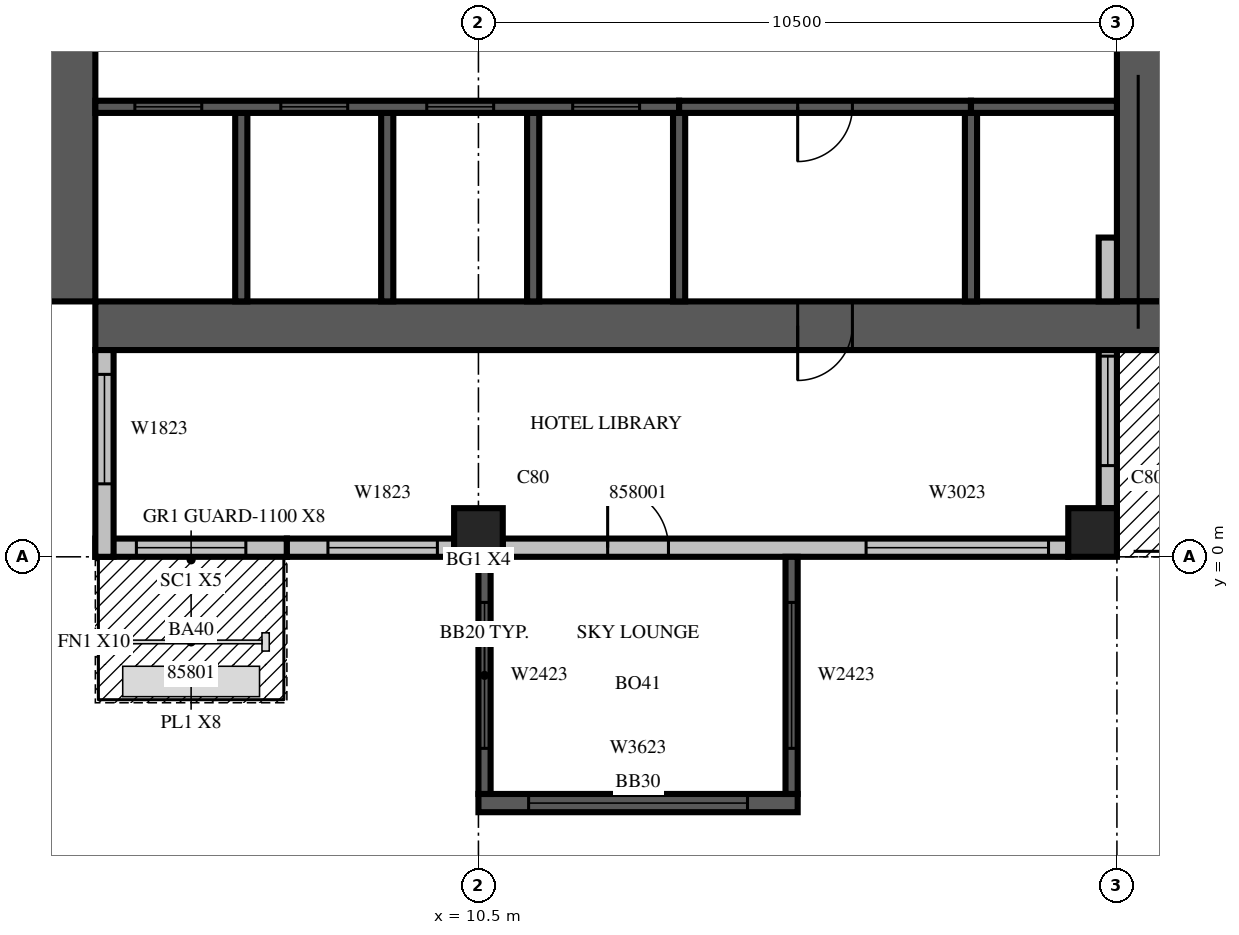
"""IFC4 building model, lengths in metres.
Left out: names, types, materials, properties, quantities, classifications, styles, units other than length and angle.
Written with IfcOpenShell. Run it as: python <this file> out.ifc"""

import sys

from ifc_helpers import new_model, si_unit, direction, frame, frame_2d, origin, origin_2d, place, context, subcontext, project, spatial, rectangle, extrude, source, transform, mapped, element, fill, save


model = new_model("IFC4")
c1 = context("Model", 3, precision=1e-05, world=origin(), true_north=direction((0.0, 1.0)))
c2 = subcontext(c1, "Body", "Model", "MODEL_VIEW")
j1 = project(units=[si_unit("LENGTHUNIT", "METRE"), si_unit("PLANEANGLEUNIT", "RADIAN")], contexts=[c1])
p1 = place(None, origin())
s1 = spatial("IfcSite", under=j1, at=p1, CompositionType="ELEMENT")
p2 = place(p1, origin())
s2 = spatial("IfcBuilding", under=s1, at=p2, CompositionType="ELEMENT")
p3 = place(p2, frame((0.0, 0.0, 253.8)))
s3 = spatial("IfcBuildingStorey", under=s2, at=p3, CompositionType="ELEMENT", Elevation=253.8)
m1 = source(origin(), c2, "Body", "SweptSolid", [
    extrude(rectangle(XDim=0.8, YDim=0.8, at=origin_2d()), origin(), (0.0, 0.0, 1.0), 3.8),
])
for number, where, z_axis, x_axis in (
    (1, (10.5, 0.4, 0.0), (0.0, 0.0, 1.0), (1.0, 0.0, 0.0)),
    (2, (20.6, 0.4, 0.0), (0.0, 0.0, 1.0), (1.0, 0.0, 0.0)),
):
    element("IfcColumn", number, at=place(p3, frame(where, z_axis=z_axis, x_axis=x_axis)), inside=s3, PredefinedType="COLUMN", context=c2, shape_type="MappedRepresentation", body=[
        mapped(m1, transform((0.0, 0.0, 0.0), scale=1.0)),
    ])
m2 = source(origin(), c2, "Body", "SweptSolid", [
    extrude(rectangle(XDim=17.6, YDim=0.8, at=frame_2d((8.8, 0.0))), origin(), (0.0, 0.0, 1.0), 3.8),
])
p4 = place(p3, frame((3.8, 4.2, 0.0), z_axis=(0.0, 0.0, 1.0), x_axis=(0.0, 1.0, 0.0)))
e3 = element("IfcWall", 3, at=p4, inside=s3, PredefinedType="SHEAR", context=c2, shape_type="MappedRepresentation", body=[
    mapped(m2, transform((0.0, 0.0, 0.0), scale=1.0)),
])
m3 = source(origin(), c2, "Body", "SweptSolid", [
    extrude(rectangle(XDim=2.2, YDim=2.1, at=frame_2d((1.1, 1.05))), frame((0.0, 0.41, 0.0), z_axis=(0.0, -1.0, 0.0), x_axis=(1.0, 0.0, 0.0)), (0.0, 0.0, 1.0), 0.82),
])
p5 = place(p4, frame((4.2, 0.0, 0.0)))
e4 = element("IfcOpeningElement", 4, at=p5, cuts=e3, PredefinedType="OPENING", context=c2, shape_type="MappedRepresentation", body=[
    mapped(m3, transform((0.0, 0.0, 0.0), scale=1.0)),
])
m4 = source(origin(), c2, "Body", "SweptSolid", [
    extrude(rectangle(XDim=0.9, YDim=2.1, at=frame_2d((0.45, 1.05))), frame((0.0, 0.41, 0.0), z_axis=(0.0, -1.0, 0.0), x_axis=(1.0, 0.0, 0.0)), (0.0, 0.0, 1.0), 0.82),
])
p6 = place(p4, frame((10.95, 0.0, 0.0)))
e5 = element("IfcOpeningElement", 5, at=p6, cuts=e3, PredefinedType="OPENING", context=c2, shape_type="MappedRepresentation", body=[
    mapped(m4, transform((0.0, 0.0, 0.0), scale=1.0)),
])
m5 = source(origin(), c2, "Body", "SweptSolid", [
    extrude(rectangle(XDim=16.8, YDim=0.8, at=frame_2d((8.4, 0.0))), origin(), (0.0, 0.0, 1.0), 3.8),
])
p7 = place(p3, frame((21.4, 4.2, 0.0), z_axis=(0.0, 0.0, 1.0), x_axis=(0.0, 1.0, 0.0)))
e6 = element("IfcWall", 6, at=p7, inside=s3, PredefinedType="SHEAR", context=c2, shape_type="MappedRepresentation", body=[
    mapped(m5, transform((0.0, 0.0, 0.0), scale=1.0)),
])
p8 = place(p7, frame((4.2, 0.0, 0.0)))
e7 = element("IfcOpeningElement", 7, at=p8, cuts=e6, PredefinedType="OPENING", context=c2, shape_type="MappedRepresentation", body=[
    mapped(m3, transform((0.0, 0.0, 0.0), scale=1.0)),
])
m6 = source(origin(), c2, "Body", "SweptSolid", [
    extrude(rectangle(XDim=1.2, YDim=2.1, at=frame_2d((0.6, 1.05))), frame((0.0, 0.41, 0.0), z_axis=(0.0, -1.0, 0.0), x_axis=(1.0, 0.0, 0.0)), (0.0, 0.0, 1.0), 0.82),
])
p9 = place(p7, frame((14.7, 0.0, 0.0)))
e8 = element("IfcOpeningElement", 8, at=p9, cuts=e6, PredefinedType="OPENING", context=c2, shape_type="MappedRepresentation", body=[
    mapped(m6, transform((0.0, 0.0, 0.0), scale=1.0)),
])
p10 = place(p3, frame((4.2, 3.8, 0.0), z_axis=(0.0, 0.0, 1.0), x_axis=(1.0, 0.0, 0.0)))
e9 = element("IfcWall", 9, at=p10, inside=s3, PredefinedType="SHEAR", context=c2, shape_type="MappedRepresentation", body=[
    mapped(m2, transform((0.0, 0.0, 0.0), scale=1.0)),
])
p11 = place(p10, frame((11.55, 0.0, 0.0)))
e10 = element("IfcOpeningElement", 10, at=p11, cuts=e9, PredefinedType="OPENING", context=c2, shape_type="MappedRepresentation", body=[
    mapped(m4, transform((0.0, 0.0, 0.0), scale=1.0)),
])
m7 = source(origin(), c2, "Body", "SweptSolid", [
    extrude(rectangle(XDim=3.15, YDim=0.3, at=frame_2d((1.575, 0.0))), origin(), (0.0, 0.0, 1.0), 3.4),
])
p12 = place(p3, frame((4.2, 0.15, 0.0), z_axis=(0.0, 0.0, 1.0), x_axis=(1.0, 0.0, 0.0)))
e11 = element("IfcWall", 11, at=p12, inside=s3, PredefinedType="STANDARD", context=c2, shape_type="MappedRepresentation", body=[
    mapped(m7, transform((0.0, 0.0, 0.0), scale=1.0)),
])
m8 = source(origin(), c2, "Body", "SweptSolid", [
    extrude(rectangle(XDim=1.8, YDim=2.4, at=frame_2d((0.9, 1.2))), frame((0.0, 0.16, 0.0), z_axis=(0.0, -1.0, 0.0), x_axis=(1.0, 0.0, 0.0)), (0.0, 0.0, 1.0), 0.32),
])
p13 = place(p12, frame((0.675, 0.0, 0.0)))
e12 = element("IfcOpeningElement", 12, at=p13, cuts=e11, PredefinedType="OPENING", context=c2, shape_type="MappedRepresentation", body=[
    mapped(m8, transform((0.0, 0.0, 0.0), scale=1.0)),
])
m9 = source(origin(), c2, "Body", "SweptSolid", [
    extrude(rectangle(XDim=2.75, YDim=0.3, at=frame_2d((1.375, 0.0))), origin(), (0.0, 0.0, 1.0), 3.4),
])
p14 = place(p3, frame((7.35, 0.15, 0.0), z_axis=(0.0, 0.0, 1.0), x_axis=(1.0, 0.0, 0.0)))
e13 = element("IfcWall", 13, at=p14, inside=s3, PredefinedType="STANDARD", context=c2, shape_type="MappedRepresentation", body=[
    mapped(m9, transform((0.0, 0.0, 0.0), scale=1.0)),
])
m10 = source(origin(), c2, "Body", "SweptSolid", [
    extrude(rectangle(XDim=1.8, YDim=2.3, at=frame_2d((0.9, 1.15))), frame((0.0, 0.16, 0.0), z_axis=(0.0, -1.0, 0.0), x_axis=(1.0, 0.0, 0.0)), (0.0, 0.0, 1.0), 0.32),
])
p15 = place(p14, frame((0.675, 0.0, 0.6)))
e14 = element("IfcOpeningElement", 14, at=p15, cuts=e13, PredefinedType="OPENING", context=c2, shape_type="MappedRepresentation", body=[
    mapped(m10, transform((0.0, 0.0, 0.0), scale=1.0)),
])
m11 = source(origin(), c2, "Body", "SweptSolid", [
    extrude(rectangle(XDim=9.3, YDim=0.3, at=frame_2d((4.65, 0.0))), origin(), (0.0, 0.0, 1.0), 3.4),
])
p16 = place(p3, frame((10.9, 0.15, 0.0), z_axis=(0.0, 0.0, 1.0), x_axis=(1.0, 0.0, 0.0)))
e15 = element("IfcWall", 15, at=p16, inside=s3, PredefinedType="STANDARD", context=c2, shape_type="MappedRepresentation", body=[
    mapped(m11, transform((0.0, 0.0, 0.0), scale=1.0)),
])
m12 = source(origin(), c2, "Body", "SweptSolid", [
    extrude(rectangle(XDim=3.0, YDim=2.3, at=frame_2d((1.5, 1.15))), frame((0.0, 0.16, 0.0), z_axis=(0.0, -1.0, 0.0), x_axis=(1.0, 0.0, 0.0)), (0.0, 0.0, 1.0), 0.32),
])
p17 = place(p16, frame((5.975, 0.0, 0.6)))
e16 = element("IfcOpeningElement", 16, at=p17, cuts=e15, PredefinedType="OPENING", context=c2, shape_type="MappedRepresentation", body=[
    mapped(m12, transform((0.0, 0.0, 0.0), scale=1.0)),
])
m13 = source(origin(), c2, "Body", "SweptSolid", [
    extrude(rectangle(XDim=1.0, YDim=2.1, at=frame_2d((0.5, 1.05))), frame((0.0, 0.16, 0.0), z_axis=(0.0, -1.0, 0.0), x_axis=(1.0, 0.0, 0.0)), (0.0, 0.0, 1.0), 0.32),
])
p18 = place(p16, frame((1.725, 0.0, 0.0)))
e17 = element("IfcOpeningElement", 17, at=p18, cuts=e15, PredefinedType="OPENING", context=c2, shape_type="MappedRepresentation", body=[
    mapped(m13, transform((0.0, 0.0, 0.0), scale=1.0)),
])
m14 = source(origin(), c2, "Body", "SweptSolid", [
    extrude(rectangle(XDim=2.6, YDim=0.3, at=frame_2d((1.3, 0.0))), origin(), (0.0, 0.0, 1.0), 3.4),
])
p19 = place(p3, frame((20.85, 0.8, 0.0), z_axis=(0.0, 0.0, 1.0), x_axis=(0.0, 1.0, 0.0)))
e18 = element("IfcWall", 18, at=p19, inside=s3, PredefinedType="STANDARD", context=c2, shape_type="MappedRepresentation", body=[
    mapped(m14, transform((0.0, 0.0, 0.0), scale=1.0)),
])
p20 = place(p19, frame((0.7, 0.0, 0.0)))
e19 = element("IfcOpeningElement", 19, at=p20, cuts=e18, PredefinedType="OPENING", context=c2, shape_type="MappedRepresentation", body=[
    mapped(m8, transform((0.0, 0.0, 0.0), scale=1.0)),
])
m15 = source(origin(), c2, "Body", "SweptSolid", [
    extrude(rectangle(XDim=1.05, YDim=0.3, at=frame_2d((0.525, 0.0))), origin(), (0.0, 0.0, 1.0), 3.4),
])
p21 = place(p3, frame((20.85, 4.2, 0.0), z_axis=(0.0, 0.0, 1.0), x_axis=(0.0, 1.0, 0.0)))
e20 = element("IfcWall", 20, at=p21, inside=s3, PredefinedType="STANDARD", context=c2, shape_type="MappedRepresentation", body=[
    mapped(m15, transform((0.0, 0.0, 0.0), scale=1.0)),
])
m16 = source(origin(), c2, "Body", "SweptSolid", [
    extrude(rectangle(XDim=3.4, YDim=0.3, at=frame_2d((1.7, 0.0))), origin(), (0.0, 0.0, 1.0), 3.4),
])
p22 = place(p3, frame((4.35, 3.4, 0.0), z_axis=(0.0, 0.0, 1.0), x_axis=(0.0, -1.0, 0.0)))
e21 = element("IfcWall", 21, at=p22, inside=s3, PredefinedType="STANDARD", context=c2, shape_type="MappedRepresentation", body=[
    mapped(m16, transform((0.0, 0.0, 0.0), scale=1.0)),
])
p23 = place(p22, frame((0.4, 0.0, 0.6)))
e22 = element("IfcOpeningElement", 22, at=p23, cuts=e21, PredefinedType="OPENING", context=c2, shape_type="MappedRepresentation", body=[
    mapped(m10, transform((0.0, 0.0, 0.0), scale=1.0)),
])
m17 = source(origin(), c2, "Body", "SweptSolid", [
    extrude(rectangle(XDim=5.25, YDim=0.3, at=frame_2d((2.625, 0.0))), origin(), (0.0, 0.0, 1.0), 3.39),
])
p24 = place(p3, frame((10.5, -4.05, 0.0), z_axis=(0.0, 0.0, 1.0), x_axis=(1.0, 0.0, 0.0)))
e23 = element("IfcWall", 23, at=p24, inside=s3, PredefinedType="SOLIDWALL", context=c2, shape_type="MappedRepresentation", body=[
    mapped(m17, transform((0.0, 0.0, 0.0), scale=1.0)),
])
m18 = source(origin(), c2, "Body", "SweptSolid", [
    extrude(rectangle(XDim=3.6, YDim=2.3, at=frame_2d((1.8, 1.15))), frame((0.0, 0.16, 0.0), z_axis=(0.0, -1.0, 0.0), x_axis=(1.0, 0.0, 0.0)), (0.0, 0.0, 1.0), 0.32),
])
p25 = place(p24, frame((0.825, 0.0, 0.6)))
e24 = element("IfcOpeningElement", 24, at=p25, cuts=e23, PredefinedType="OPENING", context=c2, shape_type="MappedRepresentation", body=[
    mapped(m18, transform((0.0, 0.0, 0.0), scale=1.0)),
])
m19 = source(origin(), c2, "Body", "SweptSolid", [
    extrude(rectangle(XDim=3.9, YDim=0.2, at=frame_2d((1.95, 0.0))), origin(), (0.0, 0.0, 1.0), 3.39),
])
p26 = place(p3, frame((10.6, 0.0, 0.0), z_axis=(0.0, 0.0, 1.0), x_axis=(0.0, -1.0, 0.0)))
e25 = element("IfcWall", 25, at=p26, inside=s3, PredefinedType="SOLIDWALL", context=c2, shape_type="MappedRepresentation", body=[
    mapped(m19, transform((0.0, 0.0, 0.0), scale=1.0)),
])
m20 = source(origin(), c2, "Body", "SweptSolid", [
    extrude(rectangle(XDim=2.4, YDim=2.3, at=frame_2d((1.2, 1.15))), frame((0.0, 0.11, 0.0), z_axis=(0.0, -1.0, 0.0), x_axis=(1.0, 0.0, 0.0)), (0.0, 0.0, 1.0), 0.22),
])
p27 = place(p26, frame((0.75, 0.0, 0.6)))
e26 = element("IfcOpeningElement", 26, at=p27, cuts=e25, PredefinedType="OPENING", context=c2, shape_type="MappedRepresentation", body=[
    mapped(m20, transform((0.0, 0.0, 0.0), scale=1.0)),
])
p28 = place(p3, frame((15.65, 0.0, 0.0), z_axis=(0.0, 0.0, 1.0), x_axis=(0.0, -1.0, 0.0)))
e27 = element("IfcWall", 27, at=p28, inside=s3, PredefinedType="SOLIDWALL", context=c2, shape_type="MappedRepresentation", body=[
    mapped(m19, transform((0.0, 0.0, 0.0), scale=1.0)),
])
p29 = place(p28, frame((0.75, 0.0, 0.6)))
e28 = element("IfcOpeningElement", 28, at=p29, cuts=e27, PredefinedType="OPENING", context=c2, shape_type="MappedRepresentation", body=[
    mapped(m20, transform((0.0, 0.0, 0.0), scale=1.0)),
])
m21 = source(origin(), c2, "Body", "SweptSolid", [
    extrude(rectangle(XDim=3.1, YDim=0.2, at=frame_2d((1.55, 0.0))), origin(), (0.0, 0.0, 1.0), 3.8),
])
for number, where, z_axis, x_axis in (
    (29, (6.6, 4.2, 0.0), (0.0, 0.0, 1.0), (0.0, 1.0, 0.0)),
    (30, (9.0, 4.2, 0.0), (0.0, 0.0, 1.0), (0.0, 1.0, 0.0)),
    (31, (11.4, 4.2, 0.0), (0.0, 0.0, 1.0), (0.0, 1.0, 0.0)),
):
    element("IfcWall", number, at=place(p3, frame(where, z_axis=z_axis, x_axis=x_axis)), inside=s3, PredefinedType="SOLIDWALL", context=c2, shape_type="MappedRepresentation", body=[
        mapped(m21, transform((0.0, 0.0, 0.0), scale=1.0)),
    ])
m22 = source(origin(), c2, "Body", "SweptSolid", [
    extrude(rectangle(XDim=3.1, YDim=0.2, at=frame_2d((1.55, 0.0))), origin(), (0.0, 0.0, 1.0), 3.4),
])
for number, where, z_axis, x_axis in (
    (32, (13.8, 4.2, 0.0), (0.0, 0.0, 1.0), (0.0, 1.0, 0.0)),
    (33, (18.6, 4.2, 0.0), (0.0, 0.0, 1.0), (0.0, 1.0, 0.0)),
):
    element("IfcWall", number, at=place(p3, frame(where, z_axis=z_axis, x_axis=x_axis)), inside=s3, PredefinedType="SOLIDWALL", context=c2, shape_type="MappedRepresentation", body=[
        mapped(m22, transform((0.0, 0.0, 0.0), scale=1.0)),
    ])
m23 = source(origin(), c2, "Body", "SweptSolid", [
    extrude(rectangle(XDim=9.6, YDim=0.2, at=frame_2d((4.8, 0.0))), origin(), (0.0, 0.0, 1.0), 3.8),
])
p30 = place(p3, frame((4.2, 7.4, 0.0), z_axis=(0.0, 0.0, 1.0), x_axis=(1.0, 0.0, 0.0)))
e34 = element("IfcWall", 34, at=p30, inside=s3, PredefinedType="SOLIDWALL", context=c2, shape_type="MappedRepresentation", body=[
    mapped(m23, transform((0.0, 0.0, 0.0), scale=1.0)),
])
m24 = source(origin(), c2, "Body", "SweptSolid", [
    extrude(rectangle(XDim=1.1, YDim=2.1, at=frame_2d((0.55, 1.05))), frame((0.0, 0.11, 0.0), z_axis=(0.0, -1.0, 0.0), x_axis=(1.0, 0.0, 0.0)), (0.0, 0.0, 1.0), 0.22),
])
p31 = place(p30, frame((0.65, 0.0, 0.0)))
e35 = element("IfcOpeningElement", 35, at=p31, cuts=e34, PredefinedType="OPENING", context=c2, shape_type="MappedRepresentation", body=[
    mapped(m24, transform((0.0, 0.0, 0.0), scale=1.0)),
])
p32 = place(p30, frame((3.05, 0.0, 0.0)))
e36 = element("IfcOpeningElement", 36, at=p32, cuts=e34, PredefinedType="OPENING", context=c2, shape_type="MappedRepresentation", body=[
    mapped(m24, transform((0.0, 0.0, 0.0), scale=1.0)),
])
p33 = place(p30, frame((5.45, 0.0, 0.0)))
e37 = element("IfcOpeningElement", 37, at=p33, cuts=e34, PredefinedType="OPENING", context=c2, shape_type="MappedRepresentation", body=[
    mapped(m24, transform((0.0, 0.0, 0.0), scale=1.0)),
])
p34 = place(p30, frame((7.85, 0.0, 0.0)))
e38 = element("IfcOpeningElement", 38, at=p34, cuts=e34, PredefinedType="OPENING", context=c2, shape_type="MappedRepresentation", body=[
    mapped(m24, transform((0.0, 0.0, 0.0), scale=1.0)),
])
m25 = source(origin(), c2, "Body", "SweptSolid", [
    extrude(rectangle(XDim=4.8, YDim=0.2, at=frame_2d((2.4, 0.0))), origin(), (0.0, 0.0, 1.0), 3.4),
])
p35 = place(p3, frame((13.8, 7.4, 0.0), z_axis=(0.0, 0.0, 1.0), x_axis=(1.0, 0.0, 0.0)))
e39 = element("IfcWall", 39, at=p35, inside=s3, PredefinedType="SOLIDWALL", context=c2, shape_type="MappedRepresentation", body=[
    mapped(m25, transform((0.0, 0.0, 0.0), scale=1.0)),
])
m26 = source(origin(), c2, "Body", "SweptSolid", [
    extrude(rectangle(XDim=0.9, YDim=2.1, at=frame_2d((0.45, 1.05))), frame((0.0, 0.11, 0.0), z_axis=(0.0, -1.0, 0.0), x_axis=(1.0, 0.0, 0.0)), (0.0, 0.0, 1.0), 0.22),
])
p36 = place(p35, frame((1.95, 0.0, 0.0)))
e40 = element("IfcOpeningElement", 40, at=p36, cuts=e39, PredefinedType="OPENING", context=c2, shape_type="MappedRepresentation", body=[
    mapped(m26, transform((0.0, 0.0, 0.0), scale=1.0)),
])
m27 = source(origin(), c2, "Body", "SweptSolid", [
    extrude(rectangle(XDim=2.4, YDim=0.2, at=frame_2d((1.2, 0.0))), origin(), (0.0, 0.0, 1.0), 3.8),
])
p37 = place(p3, frame((18.6, 7.4, 0.0), z_axis=(0.0, 0.0, 1.0), x_axis=(1.0, 0.0, 0.0)))
e41 = element("IfcWall", 41, at=p37, inside=s3, PredefinedType="SOLIDWALL", context=c2, shape_type="MappedRepresentation", body=[
    mapped(m27, transform((0.0, 0.0, 0.0), scale=1.0)),
])
m28 = source(origin(), c2, "Body", "SweptSolid", [
    extrude(rectangle(XDim=1.8, YDim=2.4, at=frame_2d((0.9, 1.2))), frame((0.0, 0.025, 0.0), z_axis=(0.0, -1.0, 0.0), x_axis=(1.0, 0.0, 0.0)), (0.0, 0.0, 1.0), 0.05),
])
p38 = place(p13, origin())
e42 = element("IfcDoor", 42, at=p38, inside=s3, OperationType="SLIDING_TO_LEFT", PredefinedType="DOOR", context=c2, shape_type="MappedRepresentation", body=[
    mapped(m28, transform((0.0, 0.0, 0.0), scale=1.0)),
])
fill(e12, e42)
m29 = source(origin(), c2, "Body", "SweptSolid", [
    extrude(rectangle(XDim=1.8, YDim=2.3, at=frame_2d((0.9, 1.15))), frame((0.0, 0.03, 0.0), z_axis=(0.0, -1.0, 0.0), x_axis=(1.0, 0.0, 0.0)), (0.0, 0.0, 1.0), 0.06),
])
p39 = place(p15, origin())
e43 = element("IfcWindow", 43, at=p39, inside=s3, PartitioningType="SINGLE_PANEL", PredefinedType="WINDOW", context=c2, shape_type="MappedRepresentation", body=[
    mapped(m29, transform((0.0, 0.0, 0.0), scale=1.0)),
])
fill(e14, e43)
m30 = source(origin(), c2, "Body", "SweptSolid", [
    extrude(rectangle(XDim=3.0, YDim=2.3, at=frame_2d((1.5, 1.15))), frame((0.0, 0.03, 0.0), z_axis=(0.0, -1.0, 0.0), x_axis=(1.0, 0.0, 0.0)), (0.0, 0.0, 1.0), 0.06),
])
p40 = place(p17, origin())
e44 = element("IfcWindow", 44, at=p40, inside=s3, PartitioningType="SINGLE_PANEL", PredefinedType="WINDOW", context=c2, shape_type="MappedRepresentation", body=[
    mapped(m30, transform((0.0, 0.0, 0.0), scale=1.0)),
])
fill(e16, e44)
p41 = place(p20, origin())
e45 = element("IfcDoor", 45, at=p41, inside=s3, OperationType="SLIDING_TO_LEFT", PredefinedType="DOOR", context=c2, shape_type="MappedRepresentation", body=[
    mapped(m28, transform((0.0, 0.0, 0.0), scale=1.0)),
])
fill(e19, e45)
p42 = place(p23, origin())
e46 = element("IfcWindow", 46, at=p42, inside=s3, PartitioningType="SINGLE_PANEL", PredefinedType="WINDOW", context=c2, shape_type="MappedRepresentation", body=[
    mapped(m29, transform((0.0, 0.0, 0.0), scale=1.0)),
])
fill(e22, e46)
m31 = source(origin(), c2, "Body", "SweptSolid", [
    extrude(rectangle(XDim=3.6, YDim=2.3, at=frame_2d((1.8, 1.15))), frame((0.0, 0.03, 0.0), z_axis=(0.0, -1.0, 0.0), x_axis=(1.0, 0.0, 0.0)), (0.0, 0.0, 1.0), 0.06),
])
p43 = place(p25, origin())
e47 = element("IfcWindow", 47, at=p43, inside=s3, PartitioningType="SINGLE_PANEL", PredefinedType="WINDOW", context=c2, shape_type="MappedRepresentation", body=[
    mapped(m31, transform((0.0, 0.0, 0.0), scale=1.0)),
])
fill(e24, e47)
m32 = source(origin(), c2, "Body", "SweptSolid", [
    extrude(rectangle(XDim=2.4, YDim=2.3, at=frame_2d((1.2, 1.15))), frame((0.0, 0.03, 0.0), z_axis=(0.0, -1.0, 0.0), x_axis=(1.0, 0.0, 0.0)), (0.0, 0.0, 1.0), 0.06),
])
p44 = place(p27, origin())
e48 = element("IfcWindow", 48, at=p44, inside=s3, PartitioningType="SINGLE_PANEL", PredefinedType="WINDOW", context=c2, shape_type="MappedRepresentation", body=[
    mapped(m32, transform((0.0, 0.0, 0.0), scale=1.0)),
])
fill(e26, e48)
p45 = place(p29, origin())
e49 = element("IfcWindow", 49, at=p45, inside=s3, PartitioningType="SINGLE_PANEL", PredefinedType="WINDOW", context=c2, shape_type="MappedRepresentation", body=[
    mapped(m32, transform((0.0, 0.0, 0.0), scale=1.0)),
])
fill(e28, e49)
m33 = source(origin(), c2, "Body", "SweptSolid", [
    extrude(rectangle(XDim=1.1, YDim=2.1, at=frame_2d((0.55, 1.05))), frame((0.0, 0.025, 0.0), z_axis=(0.0, -1.0, 0.0), x_axis=(1.0, 0.0, 0.0)), (0.0, 0.0, 1.0), 0.05),
])
p46 = place(p31, origin())
e50 = element("IfcDoor", 50, at=p46, inside=s3, OperationType="SLIDING_TO_LEFT", PredefinedType="DOOR", context=c2, shape_type="MappedRepresentation", body=[
    mapped(m33, transform((0.0, 0.0, 0.0), scale=1.0)),
])
fill(e35, e50)
p47 = place(p32, origin())
e51 = element("IfcDoor", 51, at=p47, inside=s3, OperationType="SLIDING_TO_LEFT", PredefinedType="DOOR", context=c2, shape_type="MappedRepresentation", body=[
    mapped(m33, transform((0.0, 0.0, 0.0), scale=1.0)),
])
fill(e36, e51)
p48 = place(p33, origin())
e52 = element("IfcDoor", 52, at=p48, inside=s3, OperationType="SLIDING_TO_LEFT", PredefinedType="DOOR", context=c2, shape_type="MappedRepresentation", body=[
    mapped(m33, transform((0.0, 0.0, 0.0), scale=1.0)),
])
fill(e37, e52)
p49 = place(p34, origin())
e53 = element("IfcDoor", 53, at=p49, inside=s3, OperationType="SLIDING_TO_LEFT", PredefinedType="DOOR", context=c2, shape_type="MappedRepresentation", body=[
    mapped(m33, transform((0.0, 0.0, 0.0), scale=1.0)),
])
fill(e38, e53)
m34 = source(origin(), c2, "Body", "SweptSolid", [
    extrude(rectangle(XDim=0.9, YDim=2.1, at=frame_2d((0.45, 1.05))), frame((0.0, 0.025, 0.0), z_axis=(0.0, -1.0, 0.0), x_axis=(1.0, 0.0, 0.0)), (0.0, 0.0, 1.0), 0.05),
])
p50 = place(p36, origin())
e54 = element("IfcDoor", 54, at=p50, inside=s3, OperationType="SINGLE_SWING_RIGHT", PredefinedType="DOOR", context=c2, shape_type="MappedRepresentation", body=[
    mapped(m34, transform((0.0, 0.0, 0.0), scale=1.0)),
])
fill(e40, e54)
p51 = place(p11, origin())
e55 = element("IfcDoor", 55, at=p51, inside=s3, OperationType="SINGLE_SWING_RIGHT", PredefinedType="DOOR", context=c2, shape_type="MappedRepresentation", body=[
    mapped(m34, transform((0.0, 0.0, 0.0), scale=1.0)),
])
fill(e10, e55)
m35 = source(origin(), c2, "Body", "SweptSolid", [
    extrude(rectangle(XDim=1.0, YDim=2.1, at=frame_2d((0.5, 1.05))), frame((0.0, 0.025, 0.0), z_axis=(0.0, -1.0, 0.0), x_axis=(1.0, 0.0, 0.0)), (0.0, 0.0, 1.0), 0.05),
])
p52 = place(p18, origin())
e56 = element("IfcDoor", 56, at=p52, inside=s3, OperationType="SINGLE_SWING_LEFT", PredefinedType="DOOR", context=c2, shape_type="MappedRepresentation", body=[
    mapped(m35, transform((0.0, 0.0, 0.0), scale=1.0)),
])
fill(e17, e56)
save(model, sys.argv[1])
